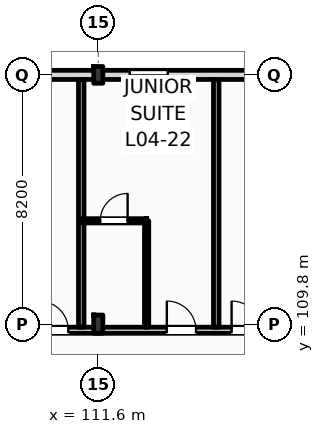
"""IFC4 building model, lengths in metres.
Left out: names, types, materials, properties, quantities, classifications, styles, units other than length and angle.
Written with IfcOpenShell. Run it as: python <this file> out.ifc"""

import sys

from ifc_helpers import new_model, si_unit, direction, frame, frame_2d, origin, origin_2d, place, context, subcontext, project, spatial, rectangle, i_section, extrude, element, fill, save


model = new_model("IFC4")
c1 = context("Model", 3, precision=1e-05, world=origin(), true_north=direction((0.0, 1.0)))
c2 = subcontext(c1, "Body", "Model", "MODEL_VIEW")
j1 = project(units=[si_unit("LENGTHUNIT", "METRE"), si_unit("PLANEANGLEUNIT", "RADIAN")], contexts=[c1])
p1 = place(None, origin())
s1 = spatial("IfcSite", under=j1, at=p1, CompositionType="ELEMENT")
p2 = place(p1, origin())
s2 = spatial("IfcBuilding", under=s1, at=p2, CompositionType="ELEMENT")
p3 = place(p2, frame((0.0, 0.0, 20.4)))
s3 = spatial("IfcBuildingStorey", under=s2, at=p3, CompositionType="ELEMENT", Elevation=20.4)
p4 = place(p3, frame((111.6, 109.8, 0.0), z_axis=(0.0, 0.0, 1.0), x_axis=(1.0, 0.0, 0.0)))
e1 = element("IfcColumn", 1, at=p4, inside=s3, PredefinedType="COLUMN", context=c2, shape_type="SweptSolid", body=[
    extrude(i_section(OverallWidth=0.3, OverallDepth=0.6, WebThickness=0.015, FlangeThickness=0.03, FilletRadius=0.027, at=origin_2d()), origin(), (0.0, 0.0, 1.0), 4.2),
])
p5 = place(p3, frame((111.6, 118.0, 0.0), z_axis=(0.0, 0.0, 1.0), x_axis=(1.0, 0.0, 0.0)))
e2 = element("IfcColumn", 2, at=p5, inside=s3, PredefinedType="COLUMN", context=c2, shape_type="SweptSolid", body=[
    extrude(i_section(OverallWidth=0.3, OverallDepth=0.55, WebThickness=0.015, FlangeThickness=0.029, FilletRadius=0.027, at=origin_2d()), origin(), (0.0, 0.0, 1.0), 4.2),
])
p6 = place(p3, frame((22.5, 118.0, 0.0), z_axis=(0.0, 0.0, 1.0), x_axis=(1.0, 0.0, 0.0)))
e3 = element("IfcWall", 3, at=p6, inside=s3, PredefinedType="STANDARD", context=c2, shape_type="SweptSolid", body=[
    extrude(rectangle(XDim=97.5, YDim=0.3, at=frame_2d((48.75, 0.0))), origin(), (0.0, 0.0, 1.0), 3.38),
])
p7 = place(p6, frame((0.91, 0.0, 0.9)))
e4 = element("IfcOpeningElement", 4, at=p7, cuts=e3, PredefinedType="OPENING", context=c2, shape_type="SweptSolid", body=[
    extrude(rectangle(XDim=0.9, YDim=1.8, at=frame_2d((0.45, 0.9))), frame((0.0, 0.16, 0.0), z_axis=(0.0, -1.0, 0.0), x_axis=(1.0, 0.0, 0.0)), (0.0, 0.0, 1.0), 0.32),
])
p8 = place(p6, frame((6.36, 0.0, 0.0)))
e5 = element("IfcOpeningElement", 5, at=p8, cuts=e3, PredefinedType="OPENING", context=c2, shape_type="SweptSolid", body=[
    extrude(rectangle(XDim=1.2, YDim=2.25, at=frame_2d((0.6, 1.125))), frame((0.0, 0.16, 0.0), z_axis=(0.0, -1.0, 0.0), x_axis=(1.0, 0.0, 0.0)), (0.0, 0.0, 1.0), 0.32),
])
p9 = place(p6, frame((11.41, 0.0, 0.9)))
e6 = element("IfcOpeningElement", 6, at=p9, cuts=e3, PredefinedType="OPENING", context=c2, shape_type="SweptSolid", body=[
    extrude(rectangle(XDim=1.1, YDim=1.9, at=frame_2d((0.55, 0.95))), frame((0.0, 0.16, 0.0), z_axis=(0.0, -1.0, 0.0), x_axis=(1.0, 0.0, 0.0)), (0.0, 0.0, 1.0), 0.32),
])
p10 = place(p6, frame((14.335, 0.0, 0.9)))
e7 = element("IfcOpeningElement", 7, at=p10, cuts=e3, PredefinedType="OPENING", context=c2, shape_type="SweptSolid", body=[
    extrude(rectangle(XDim=1.65, YDim=1.95, at=frame_2d((0.825, 0.975))), frame((0.0, 0.16, 0.0), z_axis=(0.0, -1.0, 0.0), x_axis=(1.0, 0.0, 0.0)), (0.0, 0.0, 1.0), 0.32),
])
p11 = place(p6, frame((19.26, 0.0, 0.9)))
e8 = element("IfcOpeningElement", 8, at=p11, cuts=e3, PredefinedType="OPENING", context=c2, shape_type="SweptSolid", body=[
    extrude(rectangle(XDim=1.35, YDim=2.0, at=frame_2d((0.675, 1.0))), frame((0.0, 0.16, 0.0), z_axis=(0.0, -1.0, 0.0), x_axis=(1.0, 0.0, 0.0)), (0.0, 0.0, 1.0), 0.32),
])
p12 = place(p6, frame((22.8, 0.0, 0.0)))
e9 = element("IfcOpeningElement", 9, at=p12, cuts=e3, PredefinedType="OPENING", context=c2, shape_type="SweptSolid", body=[
    extrude(rectangle(XDim=1.2, YDim=2.25, at=frame_2d((0.6, 1.125))), frame((0.0, 0.16, 0.0), z_axis=(0.0, -1.0, 0.0), x_axis=(1.0, 0.0, 0.0)), (0.0, 0.0, 1.0), 0.32),
])
p13 = place(p6, frame((26.91, 0.0, 0.9)))
e10 = element("IfcOpeningElement", 10, at=p13, cuts=e3, PredefinedType="OPENING", context=c2, shape_type="SweptSolid", body=[
    extrude(rectangle(XDim=2.1, YDim=2.1, at=frame_2d((1.05, 1.05))), frame((0.0, 0.16, 0.0), z_axis=(0.0, -1.0, 0.0), x_axis=(1.0, 0.0, 0.0)), (0.0, 0.0, 1.0), 0.32),
])
p14 = place(p6, frame((30.835, 0.0, 0.9)))
e11 = element("IfcOpeningElement", 11, at=p14, cuts=e3, PredefinedType="OPENING", context=c2, shape_type="SweptSolid", body=[
    extrude(rectangle(XDim=2.25, YDim=2.15, at=frame_2d((1.125, 1.075))), frame((0.0, 0.16, 0.0), z_axis=(0.0, -1.0, 0.0), x_axis=(1.0, 0.0, 0.0)), (0.0, 0.0, 1.0), 0.32),
])
p15 = place(p6, frame((34.96, 0.0, 0.9)))
e12 = element("IfcOpeningElement", 12, at=p15, cuts=e3, PredefinedType="OPENING", context=c2, shape_type="SweptSolid", body=[
    extrude(rectangle(XDim=2.4, YDim=2.2, at=frame_2d((1.2, 1.1))), frame((0.0, 0.16, 0.0), z_axis=(0.0, -1.0, 0.0), x_axis=(1.0, 0.0, 0.0)), (0.0, 0.0, 1.0), 0.32),
])
p16 = place(p6, frame((39.0, 0.0, 0.0)))
e13 = element("IfcOpeningElement", 13, at=p16, cuts=e3, PredefinedType="OPENING", context=c2, shape_type="SweptSolid", body=[
    extrude(rectangle(XDim=1.2, YDim=2.25, at=frame_2d((0.6, 1.125))), frame((0.0, 0.16, 0.0), z_axis=(0.0, -1.0, 0.0), x_axis=(1.0, 0.0, 0.0)), (0.0, 0.0, 1.0), 0.32),
])
p17 = place(p6, frame((43.21, 0.0, 0.9)))
e14 = element("IfcOpeningElement", 14, at=p17, cuts=e3, PredefinedType="OPENING", context=c2, shape_type="SweptSolid", body=[
    extrude(rectangle(XDim=2.7, YDim=2.3, at=frame_2d((1.35, 1.15))), frame((0.0, 0.16, 0.0), z_axis=(0.0, -1.0, 0.0), x_axis=(1.0, 0.0, 0.0)), (0.0, 0.0, 1.0), 0.32),
])
p18 = place(p6, frame((47.335, 0.0, 0.9)))
e15 = element("IfcOpeningElement", 15, at=p18, cuts=e3, PredefinedType="OPENING", context=c2, shape_type="SweptSolid", body=[
    extrude(rectangle(XDim=1.35, YDim=2.3, at=frame_2d((0.675, 1.15))), frame((0.0, 0.16, 0.0), z_axis=(0.0, -1.0, 0.0), x_axis=(1.0, 0.0, 0.0)), (0.0, 0.0, 1.0), 0.32),
])
p19 = place(p6, frame((52.74, 0.0, 0.0)))
e16 = element("IfcOpeningElement", 16, at=p19, cuts=e3, PredefinedType="OPENING", context=c2, shape_type="SweptSolid", body=[
    extrude(rectangle(XDim=1.2, YDim=2.25, at=frame_2d((0.6, 1.125))), frame((0.0, 0.16, 0.0), z_axis=(0.0, -1.0, 0.0), x_axis=(1.0, 0.0, 0.0)), (0.0, 0.0, 1.0), 0.32),
])
p20 = place(p6, frame((55.36, 0.0, 0.9)))
e17 = element("IfcOpeningElement", 17, at=p20, cuts=e3, PredefinedType="OPENING", context=c2, shape_type="SweptSolid", body=[
    extrude(rectangle(XDim=1.1, YDim=2.3, at=frame_2d((0.55, 1.15))), frame((0.0, 0.16, 0.0), z_axis=(0.0, -1.0, 0.0), x_axis=(1.0, 0.0, 0.0)), (0.0, 0.0, 1.0), 0.32),
])
p21 = place(p6, frame((59.99, 0.0, 0.9)))
e18 = element("IfcOpeningElement", 18, at=p21, cuts=e3, PredefinedType="OPENING", context=c2, shape_type="SweptSolid", body=[
    extrude(rectangle(XDim=2.74, YDim=2.3, at=frame_2d((1.37, 1.15))), frame((0.0, 0.16, 0.0), z_axis=(0.0, -1.0, 0.0), x_axis=(1.0, 0.0, 0.0)), (0.0, 0.0, 1.0), 0.32),
])
p22 = place(p6, frame((65.95, 0.0, 0.9)))
e19 = element("IfcOpeningElement", 19, at=p22, cuts=e3, PredefinedType="OPENING", context=c2, shape_type="SweptSolid", body=[
    extrude(rectangle(XDim=1.35, YDim=2.3, at=frame_2d((0.675, 1.15))), frame((0.0, 0.16, 0.0), z_axis=(0.0, -1.0, 0.0), x_axis=(1.0, 0.0, 0.0)), (0.0, 0.0, 1.0), 0.32),
])
p23 = place(p6, frame((69.16, 0.0, 0.0)))
e20 = element("IfcOpeningElement", 20, at=p23, cuts=e3, PredefinedType="OPENING", context=c2, shape_type="SweptSolid", body=[
    extrude(rectangle(XDim=1.2, YDim=2.25, at=frame_2d((0.6, 1.125))), frame((0.0, 0.16, 0.0), z_axis=(0.0, -1.0, 0.0), x_axis=(1.0, 0.0, 0.0)), (0.0, 0.0, 1.0), 0.32),
])
p24 = place(p6, frame((73.75, 0.0, 0.9)))
e21 = element("IfcOpeningElement", 21, at=p24, cuts=e3, PredefinedType="OPENING", context=c2, shape_type="SweptSolid", body=[
    extrude(rectangle(XDim=1.8, YDim=2.3, at=frame_2d((0.9, 1.15))), frame((0.0, 0.16, 0.0), z_axis=(0.0, -1.0, 0.0), x_axis=(1.0, 0.0, 0.0)), (0.0, 0.0, 1.0), 0.32),
])
p25 = place(p6, frame((76.79, 0.0, 0.9)))
e22 = element("IfcOpeningElement", 22, at=p25, cuts=e3, PredefinedType="OPENING", context=c2, shape_type="SweptSolid", body=[
    extrude(rectangle(XDim=2.74, YDim=2.3, at=frame_2d((1.37, 1.15))), frame((0.0, 0.16, 0.0), z_axis=(0.0, -1.0, 0.0), x_axis=(1.0, 0.0, 0.0)), (0.0, 0.0, 1.0), 0.32),
])
p26 = place(p6, frame((81.55, 0.0, 0.9)))
e23 = element("IfcOpeningElement", 23, at=p26, cuts=e3, PredefinedType="OPENING", context=c2, shape_type="SweptSolid", body=[
    extrude(rectangle(XDim=1.8, YDim=2.3, at=frame_2d((0.9, 1.15))), frame((0.0, 0.16, 0.0), z_axis=(0.0, -1.0, 0.0), x_axis=(1.0, 0.0, 0.0)), (0.0, 0.0, 1.0), 0.32),
])
p27 = place(p6, frame((86.01, 0.0, 0.9)))
e24 = element("IfcOpeningElement", 24, at=p27, cuts=e3, PredefinedType="OPENING", context=c2, shape_type="SweptSolid", body=[
    extrude(rectangle(XDim=1.1, YDim=1.5, at=frame_2d((0.55, 0.75))), frame((0.0, 0.16, 0.0), z_axis=(0.0, -1.0, 0.0), x_axis=(1.0, 0.0, 0.0)), (0.0, 0.0, 1.0), 0.32),
])
p28 = place(p6, frame((90.135, 0.0, 0.9)))
e25 = element("IfcOpeningElement", 25, at=p28, cuts=e3, PredefinedType="OPENING", context=c2, shape_type="SweptSolid", body=[
    extrude(rectangle(XDim=1.25, YDim=1.6, at=frame_2d((0.625, 0.8))), frame((0.0, 0.16, 0.0), z_axis=(0.0, -1.0, 0.0), x_axis=(1.0, 0.0, 0.0)), (0.0, 0.0, 1.0), 0.32),
])
p29 = place(p6, frame((94.34, 0.0, 0.9)))
e26 = element("IfcOpeningElement", 26, at=p29, cuts=e3, PredefinedType="OPENING", context=c2, shape_type="SweptSolid", body=[
    extrude(rectangle(XDim=1.4, YDim=1.7, at=frame_2d((0.7, 0.85))), frame((0.0, 0.16, 0.0), z_axis=(0.0, -1.0, 0.0), x_axis=(1.0, 0.0, 0.0)), (0.0, 0.0, 1.0), 0.32),
])
p30 = place(p3, frame((10.65, 109.6, 0.0), z_axis=(0.0, 0.0, 1.0), x_axis=(1.0, 0.0, 0.0)))
e27 = element("IfcWall", 27, at=p30, inside=s3, PredefinedType="PARTITIONING", context=c2, shape_type="SweptSolid", body=[
    extrude(rectangle(XDim=109.21, YDim=0.2, at=frame_2d((54.605, 0.0))), origin(), (0.0, 0.0, 1.0), 3.38),
])
p31 = place(p30, frame((12.535, 0.0, 0.0)))
e28 = element("IfcOpeningElement", 28, at=p31, cuts=e27, PredefinedType="OPENING", context=c2, shape_type="SweptSolid", body=[
    extrude(rectangle(XDim=1.02, YDim=2.2, at=frame_2d((0.51, 1.1))), frame((0.0, 0.11, 0.0), z_axis=(0.0, -1.0, 0.0), x_axis=(1.0, 0.0, 0.0)), (0.0, 0.0, 1.0), 0.22),
])
p32 = place(p30, frame((19.175, 0.0, 0.0)))
e29 = element("IfcOpeningElement", 29, at=p32, cuts=e27, PredefinedType="OPENING", context=c2, shape_type="SweptSolid", body=[
    extrude(rectangle(XDim=1.02, YDim=2.2, at=frame_2d((0.51, 1.1))), frame((0.0, 0.11, 0.0), z_axis=(0.0, -1.0, 0.0), x_axis=(1.0, 0.0, 0.0)), (0.0, 0.0, 1.0), 0.22),
])
p33 = place(p30, frame((23.375, 0.0, 0.0)))
e30 = element("IfcOpeningElement", 30, at=p33, cuts=e27, PredefinedType="OPENING", context=c2, shape_type="SweptSolid", body=[
    extrude(rectangle(XDim=1.02, YDim=2.2, at=frame_2d((0.51, 1.1))), frame((0.0, 0.11, 0.0), z_axis=(0.0, -1.0, 0.0), x_axis=(1.0, 0.0, 0.0)), (0.0, 0.0, 1.0), 0.22),
])
p34 = place(p30, frame((27.575, 0.0, 0.0)))
e31 = element("IfcOpeningElement", 31, at=p34, cuts=e27, PredefinedType="OPENING", context=c2, shape_type="SweptSolid", body=[
    extrude(rectangle(XDim=1.02, YDim=2.2, at=frame_2d((0.51, 1.1))), frame((0.0, 0.11, 0.0), z_axis=(0.0, -1.0, 0.0), x_axis=(1.0, 0.0, 0.0)), (0.0, 0.0, 1.0), 0.22),
])
p35 = place(p30, frame((31.805, 0.0, 0.0)))
e32 = element("IfcOpeningElement", 32, at=p35, cuts=e27, PredefinedType="OPENING", context=c2, shape_type="SweptSolid", body=[
    extrude(rectangle(XDim=0.96, YDim=2.2, at=frame_2d((0.48, 1.1))), frame((0.0, 0.11, 0.0), z_axis=(0.0, -1.0, 0.0), x_axis=(1.0, 0.0, 0.0)), (0.0, 0.0, 1.0), 0.22),
])
p36 = place(p30, frame((33.855, 0.0, 0.0)))
e33 = element("IfcOpeningElement", 33, at=p36, cuts=e27, PredefinedType="OPENING", context=c2, shape_type="SweptSolid", body=[
    extrude(rectangle(XDim=0.96, YDim=2.2, at=frame_2d((0.48, 1.1))), frame((0.0, 0.11, 0.0), z_axis=(0.0, -1.0, 0.0), x_axis=(1.0, 0.0, 0.0)), (0.0, 0.0, 1.0), 0.22),
])
p37 = place(p30, frame((40.205, 0.0, 0.0)))
e34 = element("IfcOpeningElement", 34, at=p37, cuts=e27, PredefinedType="OPENING", context=c2, shape_type="SweptSolid", body=[
    extrude(rectangle(XDim=0.96, YDim=2.2, at=frame_2d((0.48, 1.1))), frame((0.0, 0.11, 0.0), z_axis=(0.0, -1.0, 0.0), x_axis=(1.0, 0.0, 0.0)), (0.0, 0.0, 1.0), 0.22),
])
p38 = place(p30, frame((42.255, 0.0, 0.0)))
e35 = element("IfcOpeningElement", 35, at=p38, cuts=e27, PredefinedType="OPENING", context=c2, shape_type="SweptSolid", body=[
    extrude(rectangle(XDim=0.96, YDim=2.2, at=frame_2d((0.48, 1.1))), frame((0.0, 0.11, 0.0), z_axis=(0.0, -1.0, 0.0), x_axis=(1.0, 0.0, 0.0)), (0.0, 0.0, 1.0), 0.22),
])
p39 = place(p30, frame((48.605, 0.0, 0.0)))
e36 = element("IfcOpeningElement", 36, at=p39, cuts=e27, PredefinedType="OPENING", context=c2, shape_type="SweptSolid", body=[
    extrude(rectangle(XDim=0.96, YDim=2.2, at=frame_2d((0.48, 1.1))), frame((0.0, 0.11, 0.0), z_axis=(0.0, -1.0, 0.0), x_axis=(1.0, 0.0, 0.0)), (0.0, 0.0, 1.0), 0.22),
])
p40 = place(p30, frame((50.655, 0.0, 0.0)))
e37 = element("IfcOpeningElement", 37, at=p40, cuts=e27, PredefinedType="OPENING", context=c2, shape_type="SweptSolid", body=[
    extrude(rectangle(XDim=0.96, YDim=2.2, at=frame_2d((0.48, 1.1))), frame((0.0, 0.11, 0.0), z_axis=(0.0, -1.0, 0.0), x_axis=(1.0, 0.0, 0.0)), (0.0, 0.0, 1.0), 0.22),
])
p41 = place(p30, frame((57.005, 0.0, 0.0)))
e38 = element("IfcOpeningElement", 38, at=p41, cuts=e27, PredefinedType="OPENING", context=c2, shape_type="SweptSolid", body=[
    extrude(rectangle(XDim=0.96, YDim=2.2, at=frame_2d((0.48, 1.1))), frame((0.0, 0.11, 0.0), z_axis=(0.0, -1.0, 0.0), x_axis=(1.0, 0.0, 0.0)), (0.0, 0.0, 1.0), 0.22),
])
p42 = place(p30, frame((59.055, 0.0, 0.0)))
e39 = element("IfcOpeningElement", 39, at=p42, cuts=e27, PredefinedType="OPENING", context=c2, shape_type="SweptSolid", body=[
    extrude(rectangle(XDim=0.96, YDim=2.2, at=frame_2d((0.48, 1.1))), frame((0.0, 0.11, 0.0), z_axis=(0.0, -1.0, 0.0), x_axis=(1.0, 0.0, 0.0)), (0.0, 0.0, 1.0), 0.22),
])
p43 = place(p30, frame((65.405, 0.0, 0.0)))
e40 = element("IfcOpeningElement", 40, at=p43, cuts=e27, PredefinedType="OPENING", context=c2, shape_type="SweptSolid", body=[
    extrude(rectangle(XDim=0.96, YDim=2.2, at=frame_2d((0.48, 1.1))), frame((0.0, 0.11, 0.0), z_axis=(0.0, -1.0, 0.0), x_axis=(1.0, 0.0, 0.0)), (0.0, 0.0, 1.0), 0.22),
])
p44 = place(p30, frame((67.205, 0.0, 0.0)))
e41 = element("IfcOpeningElement", 41, at=p44, cuts=e27, PredefinedType="OPENING", context=c2, shape_type="SweptSolid", body=[
    extrude(rectangle(XDim=0.96, YDim=2.2, at=frame_2d((0.48, 1.1))), frame((0.0, 0.11, 0.0), z_axis=(0.0, -1.0, 0.0), x_axis=(1.0, 0.0, 0.0)), (0.0, 0.0, 1.0), 0.22),
])
p45 = place(p30, frame((73.805, 0.0, 0.0)))
e42 = element("IfcOpeningElement", 42, at=p45, cuts=e27, PredefinedType="OPENING", context=c2, shape_type="SweptSolid", body=[
    extrude(rectangle(XDim=0.96, YDim=2.2, at=frame_2d((0.48, 1.1))), frame((0.0, 0.11, 0.0), z_axis=(0.0, -1.0, 0.0), x_axis=(1.0, 0.0, 0.0)), (0.0, 0.0, 1.0), 0.22),
])
p46 = place(p30, frame((78.255, 0.0, 0.0)))
e43 = element("IfcOpeningElement", 43, at=p46, cuts=e27, PredefinedType="OPENING", context=c2, shape_type="SweptSolid", body=[
    extrude(rectangle(XDim=0.96, YDim=2.2, at=frame_2d((0.48, 1.1))), frame((0.0, 0.11, 0.0), z_axis=(0.0, -1.0, 0.0), x_axis=(1.0, 0.0, 0.0)), (0.0, 0.0, 1.0), 0.22),
])
p47 = place(p30, frame((82.205, 0.0, 0.0)))
e44 = element("IfcOpeningElement", 44, at=p47, cuts=e27, PredefinedType="OPENING", context=c2, shape_type="SweptSolid", body=[
    extrude(rectangle(XDim=0.96, YDim=2.2, at=frame_2d((0.48, 1.1))), frame((0.0, 0.11, 0.0), z_axis=(0.0, -1.0, 0.0), x_axis=(1.0, 0.0, 0.0)), (0.0, 0.0, 1.0), 0.22),
])
p48 = place(p30, frame((86.405, 0.0, 0.0)))
e45 = element("IfcOpeningElement", 45, at=p48, cuts=e27, PredefinedType="OPENING", context=c2, shape_type="SweptSolid", body=[
    extrude(rectangle(XDim=0.96, YDim=2.2, at=frame_2d((0.48, 1.1))), frame((0.0, 0.11, 0.0), z_axis=(0.0, -1.0, 0.0), x_axis=(1.0, 0.0, 0.0)), (0.0, 0.0, 1.0), 0.22),
])
p49 = place(p30, frame((90.605, 0.0, 0.0)))
e46 = element("IfcOpeningElement", 46, at=p49, cuts=e27, PredefinedType="OPENING", context=c2, shape_type="SweptSolid", body=[
    extrude(rectangle(XDim=0.96, YDim=2.2, at=frame_2d((0.48, 1.1))), frame((0.0, 0.11, 0.0), z_axis=(0.0, -1.0, 0.0), x_axis=(1.0, 0.0, 0.0)), (0.0, 0.0, 1.0), 0.22),
])
p50 = place(p30, frame((94.805, 0.0, 0.0)))
e47 = element("IfcOpeningElement", 47, at=p50, cuts=e27, PredefinedType="OPENING", context=c2, shape_type="SweptSolid", body=[
    extrude(rectangle(XDim=0.96, YDim=2.2, at=frame_2d((0.48, 1.1))), frame((0.0, 0.11, 0.0), z_axis=(0.0, -1.0, 0.0), x_axis=(1.0, 0.0, 0.0)), (0.0, 0.0, 1.0), 0.22),
])
p51 = place(p30, frame((99.005, 0.0, 0.0)))
e48 = element("IfcOpeningElement", 48, at=p51, cuts=e27, PredefinedType="OPENING", context=c2, shape_type="SweptSolid", body=[
    extrude(rectangle(XDim=0.96, YDim=2.2, at=frame_2d((0.48, 1.1))), frame((0.0, 0.11, 0.0), z_axis=(0.0, -1.0, 0.0), x_axis=(1.0, 0.0, 0.0)), (0.0, 0.0, 1.0), 0.22),
])
p52 = place(p30, frame((103.205, 0.0, 0.0)))
e49 = element("IfcOpeningElement", 49, at=p52, cuts=e27, PredefinedType="OPENING", context=c2, shape_type="SweptSolid", body=[
    extrude(rectangle(XDim=0.96, YDim=2.2, at=frame_2d((0.48, 1.1))), frame((0.0, 0.11, 0.0), z_axis=(0.0, -1.0, 0.0), x_axis=(1.0, 0.0, 0.0)), (0.0, 0.0, 1.0), 0.22),
])
p53 = place(p30, frame((105.335, 0.0, 0.0)))
e50 = element("IfcOpeningElement", 50, at=p53, cuts=e27, PredefinedType="OPENING", context=c2, shape_type="SweptSolid", body=[
    extrude(rectangle(XDim=0.96, YDim=2.2, at=frame_2d((0.48, 1.1))), frame((0.0, 0.11, 0.0), z_axis=(0.0, -1.0, 0.0), x_axis=(1.0, 0.0, 0.0)), (0.0, 0.0, 1.0), 0.22),
])
p54 = place(p30, frame((2.716, 0.0, 0.0)))
e51 = element("IfcOpeningElement", 51, at=p54, cuts=e27, PredefinedType="OPENING", context=c2, shape_type="SweptSolid", body=[
    extrude(rectangle(XDim=1.35, YDim=2.25, at=frame_2d((0.675, 1.125))), frame((0.0, 0.11, 0.0), z_axis=(0.0, -1.0, 0.0), x_axis=(1.0, 0.0, 0.0)), (0.0, 0.0, 1.0), 0.22),
])
p55 = place(p30, frame((6.65, 0.0, 0.0)))
e52 = element("IfcOpeningElement", 52, at=p55, cuts=e27, PredefinedType="OPENING", context=c2, shape_type="SweptSolid", body=[
    extrude(rectangle(XDim=1.35, YDim=2.25, at=frame_2d((0.675, 1.125))), frame((0.0, 0.11, 0.0), z_axis=(0.0, -1.0, 0.0), x_axis=(1.0, 0.0, 0.0)), (0.0, 0.0, 1.0), 0.22),
])
p56 = place(p30, frame((10.583, 0.0, 0.0)))
e53 = element("IfcOpeningElement", 53, at=p56, cuts=e27, PredefinedType="OPENING", context=c2, shape_type="SweptSolid", body=[
    extrude(rectangle(XDim=1.35, YDim=2.25, at=frame_2d((0.675, 1.125))), frame((0.0, 0.11, 0.0), z_axis=(0.0, -1.0, 0.0), x_axis=(1.0, 0.0, 0.0)), (0.0, 0.0, 1.0), 0.22),
])
for number, where, z_axis, x_axis in (
    (54, (111.04, 109.7, 0.0), (0.0, 0.0, 1.0), (0.0, 1.0, 0.0)),
    (55, (115.48, 109.7, 0.0), (0.0, 0.0, 1.0), (0.0, 1.0, 0.0)),
):
    element("IfcWall", number, at=place(p3, frame(where, z_axis=z_axis, x_axis=x_axis)), inside=s3, PredefinedType="PARTITIONING", context=c2, shape_type="SweptSolid", body=[
        extrude(rectangle(XDim=8.15, YDim=0.18, at=frame_2d((4.075, 0.0))), origin(), (0.0, 0.0, 1.0), 3.94),
    ])
p57 = place(p3, frame((113.19, 109.7, 0.0), z_axis=(0.0, 0.0, 1.0), x_axis=(0.0, 1.0, 0.0)))
e56 = element("IfcWall", 56, at=p57, inside=s3, PredefinedType="PARTITIONING", context=c2, shape_type="SweptSolid", body=[
    extrude(rectangle(XDim=3.5, YDim=0.14, at=frame_2d((1.75, 0.0))), origin(), (0.0, 0.0, 1.0), 3.94),
])
p58 = place(p3, frame((111.04, 113.2, 0.0), z_axis=(0.0, 0.0, 1.0), x_axis=(1.0, 0.0, 0.0)))
e57 = element("IfcWall", 57, at=p58, inside=s3, PredefinedType="PARTITIONING", context=c2, shape_type="SweptSolid", body=[
    extrude(rectangle(XDim=2.15, YDim=0.14, at=frame_2d((1.075, 0.0))), origin(), (0.0, 0.0, 1.0), 3.94),
])
p59 = place(p58, frame((0.625, 0.0, 0.0)))
e58 = element("IfcOpeningElement", 58, at=p59, cuts=e57, PredefinedType="OPENING", context=c2, shape_type="SweptSolid", body=[
    extrude(rectangle(XDim=0.9, YDim=2.1, at=frame_2d((0.45, 1.05))), frame((0.0, 0.08, 0.0), z_axis=(0.0, -1.0, 0.0), x_axis=(1.0, 0.0, 0.0)), (0.0, 0.0, 1.0), 0.16),
])
p60 = place(p28, origin())
e59 = element("IfcWindow", 59, at=p60, inside=s3, PartitioningType="DOUBLE_PANEL_VERTICAL", PredefinedType="WINDOW", context=c2, shape_type="SweptSolid", body=[
    extrude(rectangle(XDim=1.25, YDim=1.6, at=frame_2d((0.625, 0.8))), frame((0.0, 0.03, 0.0), z_axis=(0.0, -1.0, 0.0), x_axis=(1.0, 0.0, 0.0)), (0.0, 0.0, 1.0), 0.06),
])
fill(e25, e59)
p61 = place(p51, origin())
e60 = element("IfcDoor", 60, at=p61, inside=s3, OperationType="SINGLE_SWING_LEFT", PredefinedType="DOOR", context=c2, shape_type="SweptSolid", body=[
    extrude(rectangle(XDim=0.96, YDim=2.2, at=frame_2d((0.48, 1.1))), frame((0.0, 0.025, 0.0), z_axis=(0.0, -1.0, 0.0), x_axis=(1.0, 0.0, 0.0)), (0.0, 0.0, 1.0), 0.05),
])
fill(e48, e60)
p62 = place(p52, origin())
e61 = element("IfcDoor", 61, at=p62, inside=s3, OperationType="SINGLE_SWING_LEFT", PredefinedType="DOOR", context=c2, shape_type="SweptSolid", body=[
    extrude(rectangle(XDim=0.96, YDim=2.2, at=frame_2d((0.48, 1.1))), frame((0.0, 0.025, 0.0), z_axis=(0.0, -1.0, 0.0), x_axis=(1.0, 0.0, 0.0)), (0.0, 0.0, 1.0), 0.05),
])
fill(e49, e61)
p63 = place(p59, origin())
e62 = element("IfcDoor", 62, at=p63, inside=s3, OperationType="SINGLE_SWING_RIGHT", PredefinedType="DOOR", context=c2, shape_type="SweptSolid", body=[
    extrude(rectangle(XDim=0.9, YDim=2.1, at=frame_2d((0.45, 1.05))), frame((0.0, 0.025, 0.0), z_axis=(0.0, -1.0, 0.0), x_axis=(1.0, 0.0, 0.0)), (0.0, 0.0, 1.0), 0.05),
])
fill(e58, e62)
p64 = place(p53, origin())
e63 = element("IfcDoor", 63, at=p64, inside=s3, OperationType="SINGLE_SWING_LEFT", PredefinedType="DOOR", context=c2, shape_type="SweptSolid", body=[
    extrude(rectangle(XDim=0.96, YDim=2.2, at=frame_2d((0.48, 1.1))), frame((0.0, 0.025, 0.0), z_axis=(0.0, -1.0, 0.0), x_axis=(1.0, 0.0, 0.0)), (0.0, 0.0, 1.0), 0.05),
])
fill(e50, e63)
save(model, sys.argv[1])
